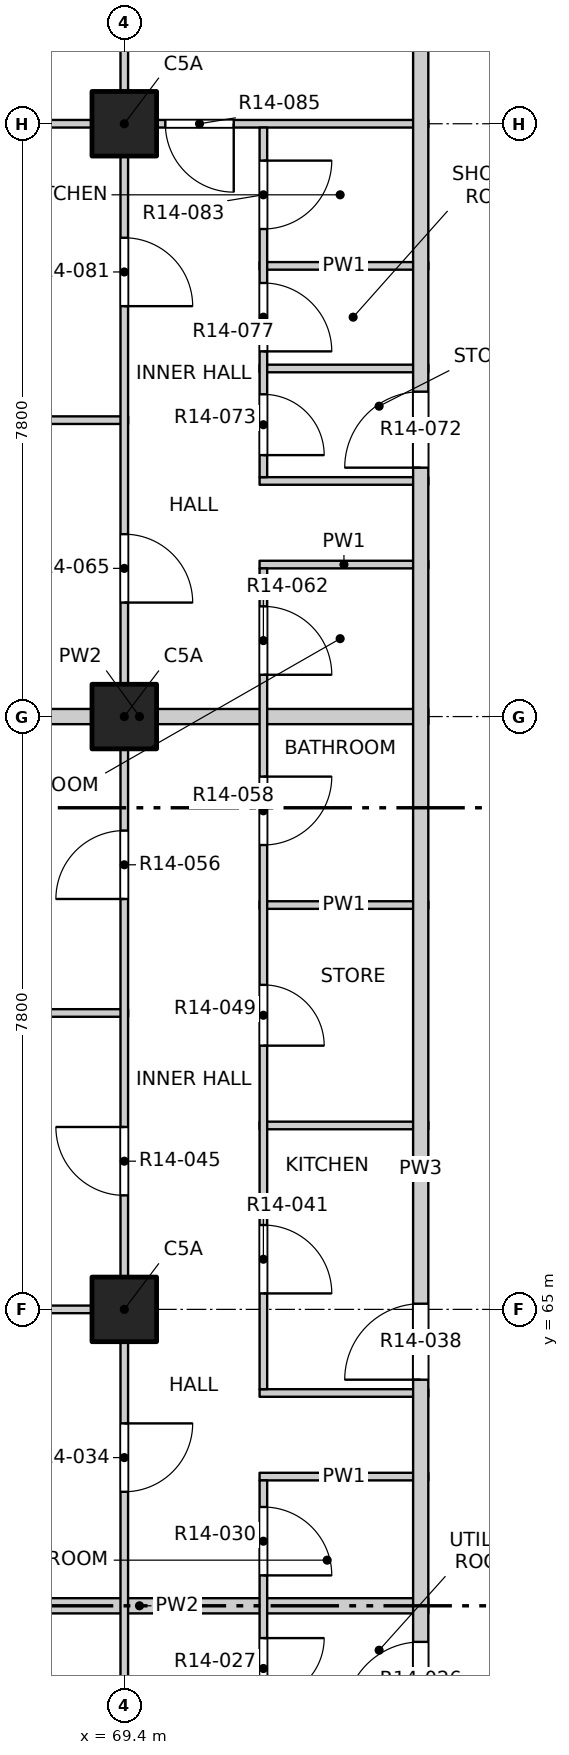
"""IFC4 building model, lengths in metres.
Left out: names, types, materials, properties, quantities, classifications, styles, units other than length and angle.
Written with IfcOpenShell. Run it as: python <this file> out.ifc"""

import sys

from ifc_helpers import new_model, si_unit, direction, frame, frame_2d, origin, origin_2d, place, context, subcontext, project, spatial, rectangle, extrude, element, fill, save


model = new_model("IFC4")
c1 = context("Model", 3, precision=1e-05, world=origin(), true_north=direction((0.0, 1.0)))
c2 = subcontext(c1, "Body", "Model", "MODEL_VIEW")
j1 = project(units=[si_unit("LENGTHUNIT", "METRE"), si_unit("PLANEANGLEUNIT", "RADIAN")], contexts=[c1])
p1 = place(None, origin())
s1 = spatial("IfcSite", under=j1, at=p1, CompositionType="ELEMENT")
p2 = place(p1, origin())
s2 = spatial("IfcBuilding", under=s1, at=p2, CompositionType="ELEMENT")
p3 = place(p2, frame((0.0, 0.0, 152.0)))
s3 = spatial("IfcBuildingStorey", under=s2, at=p3, CompositionType="ELEMENT", Elevation=152.0)
for number, where, z_axis, x_axis in (
    (1, (69.4, 65.0, -0.25), (0.0, 0.0, 1.0), (1.0, 0.0, 0.0)),
    (2, (69.4, 72.8, -0.25), (0.0, 0.0, 1.0), (1.0, 0.0, 0.0)),
    (3, (69.4, 80.6, -0.25), (0.0, 0.0, 1.0), (1.0, 0.0, 0.0)),
):
    element("IfcColumn", number, at=place(p3, frame(where, z_axis=z_axis, x_axis=x_axis)), inside=s3, PredefinedType="COLUMN", context=c2, shape_type="SweptSolid", body=[
        extrude(rectangle(XDim=0.85, YDim=0.85, at=origin_2d()), origin(), (0.0, 0.0, 1.0), 3.4),
    ])
p4 = place(p3, frame((65.8, 61.1, 0.0), z_axis=(0.0, 0.0, 1.0), x_axis=(1.0, 0.0, 0.0)))
e4 = element("IfcWall", 4, at=p4, inside=s3, PredefinedType="PARTITIONING", context=c2, shape_type="SweptSolid", body=[
    extrude(rectangle(XDim=7.6, YDim=0.2, at=frame_2d((3.8, 0.0))), origin(), (0.0, 0.0, 1.0), 2.55),
])
for number, where, z_axis, x_axis in (
    (5, (71.18, 62.8, 0.0), (0.0, 0.0, 1.0), (1.0, 0.0, 0.0)),
    (6, (71.18, 63.9, 0.0), (0.0, 0.0, 1.0), (1.0, 0.0, 0.0)),
):
    element("IfcWall", number, at=place(p3, frame(where, z_axis=z_axis, x_axis=x_axis)), inside=s3, PredefinedType="PARTITIONING", context=c2, shape_type="SweptSolid", body=[
        extrude(rectangle(XDim=2.22, YDim=0.1, at=frame_2d((1.11, 0.0))), origin(), (0.0, 0.0, 1.0), 3.15),
    ])
p5 = place(p3, frame((65.8, 65.0, 0.0), z_axis=(0.0, 0.0, 1.0), x_axis=(1.0, 0.0, 0.0)))
e7 = element("IfcWall", 7, at=p5, inside=s3, PredefinedType="PARTITIONING", context=c2, shape_type="SweptSolid", body=[
    extrude(rectangle(XDim=3.65, YDim=0.1, at=frame_2d((1.825, 0.0))), origin(), (0.0, 0.0, 1.0), 3.15),
])
p6 = place(p3, frame((71.18, 67.42, 0.0), z_axis=(0.0, 0.0, 1.0), x_axis=(1.0, 0.0, 0.0)))
e8 = element("IfcWall", 8, at=p6, inside=s3, PredefinedType="PARTITIONING", context=c2, shape_type="SweptSolid", body=[
    extrude(rectangle(XDim=2.22, YDim=0.1, at=frame_2d((1.11, 0.0))), origin(), (0.0, 0.0, 1.0), 3.15),
])
p7 = place(p3, frame((65.8, 68.9, 0.0), z_axis=(0.0, 0.0, 1.0), x_axis=(1.0, 0.0, 0.0)))
e9 = element("IfcWall", 9, at=p7, inside=s3, PredefinedType="PARTITIONING", context=c2, shape_type="SweptSolid", body=[
    extrude(rectangle(XDim=3.65, YDim=0.1, at=frame_2d((1.825, 0.0))), origin(), (0.0, 0.0, 1.0), 2.55),
])
p8 = place(p3, frame((71.18, 70.32, 0.0), z_axis=(0.0, 0.0, 1.0), x_axis=(1.0, 0.0, 0.0)))
e10 = element("IfcWall", 10, at=p8, inside=s3, PredefinedType="PARTITIONING", context=c2, shape_type="SweptSolid", body=[
    extrude(rectangle(XDim=2.22, YDim=0.1, at=frame_2d((1.11, 0.0))), origin(), (0.0, 0.0, 1.0), 3.15),
])
p9 = place(p3, frame((65.8, 72.8, 0.0), z_axis=(0.0, 0.0, 1.0), x_axis=(1.0, 0.0, 0.0)))
e11 = element("IfcWall", 11, at=p9, inside=s3, PredefinedType="PARTITIONING", context=c2, shape_type="SweptSolid", body=[
    extrude(rectangle(XDim=7.6, YDim=0.2, at=frame_2d((3.8, 0.0))), origin(), (0.0, 0.0, 1.0), 3.15),
])
for number, where, z_axis, x_axis in (
    (12, (71.18, 74.8, 0.0), (0.0, 0.0, 1.0), (1.0, 0.0, 0.0)),
    (13, (71.18, 75.9, 0.0), (0.0, 0.0, 1.0), (1.0, 0.0, 0.0)),
):
    element("IfcWall", number, at=place(p3, frame(where, z_axis=z_axis, x_axis=x_axis)), inside=s3, PredefinedType="PARTITIONING", context=c2, shape_type="SweptSolid", body=[
        extrude(rectangle(XDim=2.22, YDim=0.1, at=frame_2d((1.11, 0.0))), origin(), (0.0, 0.0, 1.0), 3.15),
    ])
p10 = place(p3, frame((65.8, 76.7, 0.0), z_axis=(0.0, 0.0, 1.0), x_axis=(1.0, 0.0, 0.0)))
e14 = element("IfcWall", 14, at=p10, inside=s3, PredefinedType="PARTITIONING", context=c2, shape_type="SweptSolid", body=[
    extrude(rectangle(XDim=3.65, YDim=0.1, at=frame_2d((1.825, 0.0))), origin(), (0.0, 0.0, 1.0), 2.55),
])
for number, where, z_axis, x_axis in (
    (15, (71.18, 77.38, 0.0), (0.0, 0.0, 1.0), (1.0, 0.0, 0.0)),
    (16, (71.18, 78.73, 0.0), (0.0, 0.0, 1.0), (1.0, 0.0, 0.0)),
):
    element("IfcWall", number, at=place(p3, frame(where, z_axis=z_axis, x_axis=x_axis)), inside=s3, PredefinedType="PARTITIONING", context=c2, shape_type="SweptSolid", body=[
        extrude(rectangle(XDim=2.22, YDim=0.1, at=frame_2d((1.11, 0.0))), origin(), (0.0, 0.0, 1.0), 3.15),
    ])
p11 = place(p3, frame((65.8, 80.6, 0.0), z_axis=(0.0, 0.0, 1.0), x_axis=(1.0, 0.0, 0.0)))
e17 = element("IfcWall", 17, at=p11, inside=s3, PredefinedType="PARTITIONING", context=c2, shape_type="SweptSolid", body=[
    extrude(rectangle(XDim=7.6, YDim=0.1, at=frame_2d((3.8, 0.0))), origin(), (0.0, 0.0, 1.0), 3.15),
])
p12 = place(p11, frame((4.14, 0.0, 0.0)))
e18 = element("IfcOpeningElement", 18, at=p12, cuts=e17, PredefinedType="OPENING", context=c2, shape_type="SweptSolid", body=[
    extrude(rectangle(XDim=0.9, YDim=2.1, at=frame_2d((0.45, 1.05))), frame((0.0, 0.06, 0.0), z_axis=(0.0, -1.0, 0.0), x_axis=(1.0, 0.0, 0.0)), (0.0, 0.0, 1.0), 0.12),
])
p13 = place(p3, frame((69.4, 45.8, 0.0), z_axis=(0.0, 0.0, 1.0), x_axis=(0.0, 1.0, 0.0)))
e19 = element("IfcWall", 19, at=p13, inside=s3, PredefinedType="PARTITIONING", context=c2, shape_type="SweptSolid", body=[
    extrude(rectangle(XDim=38.4, YDim=0.1, at=frame_2d((19.2, 0.0))), origin(), (0.0, 0.0, 1.0), 3.15),
])
p14 = place(p13, frame((1.05, 0.0, 0.0)))
e20 = element("IfcOpeningElement", 20, at=p14, cuts=e19, PredefinedType="OPENING", context=c2, shape_type="SweptSolid", body=[
    extrude(rectangle(XDim=1.2, YDim=2.1, at=frame_2d((0.6, 1.05))), frame((0.0, 0.06, 0.0), z_axis=(0.0, -1.0, 0.0), x_axis=(1.0, 0.0, 0.0)), (0.0, 0.0, 1.0), 0.12),
])
p15 = place(p13, frame((6.9, 0.0, 0.0)))
e21 = element("IfcOpeningElement", 21, at=p15, cuts=e19, PredefinedType="OPENING", context=c2, shape_type="SweptSolid", body=[
    extrude(rectangle(XDim=1.2, YDim=2.1, at=frame_2d((0.6, 1.05))), frame((0.0, 0.06, 0.0), z_axis=(0.0, -1.0, 0.0), x_axis=(1.0, 0.0, 0.0)), (0.0, 0.0, 1.0), 0.12),
])
p16 = place(p13, frame((12.9, 0.0, 0.0)))
e22 = element("IfcOpeningElement", 22, at=p16, cuts=e19, PredefinedType="OPENING", context=c2, shape_type="SweptSolid", body=[
    extrude(rectangle(XDim=0.9, YDim=2.1, at=frame_2d((0.45, 1.05))), frame((0.0, 0.06, 0.0), z_axis=(0.0, -1.0, 0.0), x_axis=(1.0, 0.0, 0.0)), (0.0, 0.0, 1.0), 0.12),
])
p17 = place(p13, frame((16.8, 0.0, 0.0)))
e23 = element("IfcOpeningElement", 23, at=p17, cuts=e19, PredefinedType="OPENING", context=c2, shape_type="SweptSolid", body=[
    extrude(rectangle(XDim=0.9, YDim=2.1, at=frame_2d((0.45, 1.05))), frame((0.0, 0.06, 0.0), z_axis=(0.0, -1.0, 0.0), x_axis=(1.0, 0.0, 0.0)), (0.0, 0.0, 1.0), 0.12),
])
p18 = place(p13, frame((20.7, 0.0, 0.0)))
e24 = element("IfcOpeningElement", 24, at=p18, cuts=e19, PredefinedType="OPENING", context=c2, shape_type="SweptSolid", body=[
    extrude(rectangle(XDim=0.9, YDim=2.1, at=frame_2d((0.45, 1.05))), frame((0.0, 0.06, 0.0), z_axis=(0.0, -1.0, 0.0), x_axis=(1.0, 0.0, 0.0)), (0.0, 0.0, 1.0), 0.12),
])
p19 = place(p13, frame((24.6, 0.0, 0.0)))
e25 = element("IfcOpeningElement", 25, at=p19, cuts=e19, PredefinedType="OPENING", context=c2, shape_type="SweptSolid", body=[
    extrude(rectangle(XDim=0.9, YDim=2.1, at=frame_2d((0.45, 1.05))), frame((0.0, 0.06, 0.0), z_axis=(0.0, -1.0, 0.0), x_axis=(1.0, 0.0, 0.0)), (0.0, 0.0, 1.0), 0.12),
])
p20 = place(p13, frame((28.5, 0.0, 0.0)))
e26 = element("IfcOpeningElement", 26, at=p20, cuts=e19, PredefinedType="OPENING", context=c2, shape_type="SweptSolid", body=[
    extrude(rectangle(XDim=0.9, YDim=2.1, at=frame_2d((0.45, 1.05))), frame((0.0, 0.06, 0.0), z_axis=(0.0, -1.0, 0.0), x_axis=(1.0, 0.0, 0.0)), (0.0, 0.0, 1.0), 0.12),
])
p21 = place(p13, frame((32.4, 0.0, 0.0)))
e27 = element("IfcOpeningElement", 27, at=p21, cuts=e19, PredefinedType="OPENING", context=c2, shape_type="SweptSolid", body=[
    extrude(rectangle(XDim=0.9, YDim=2.1, at=frame_2d((0.45, 1.05))), frame((0.0, 0.06, 0.0), z_axis=(0.0, -1.0, 0.0), x_axis=(1.0, 0.0, 0.0)), (0.0, 0.0, 1.0), 0.12),
])
p22 = place(p13, frame((36.15, 0.0, 0.0)))
e28 = element("IfcOpeningElement", 28, at=p22, cuts=e19, PredefinedType="OPENING", context=c2, shape_type="SweptSolid", body=[
    extrude(rectangle(XDim=1.2, YDim=2.1, at=frame_2d((0.6, 1.05))), frame((0.0, 0.06, 0.0), z_axis=(0.0, -1.0, 0.0), x_axis=(1.0, 0.0, 0.0)), (0.0, 0.0, 1.0), 0.12),
])
p23 = place(p3, frame((71.23, 59.5, 0.0), z_axis=(0.0, 0.0, 1.0), x_axis=(0.0, 1.0, 0.0)))
e29 = element("IfcWall", 29, at=p23, inside=s3, PredefinedType="PARTITIONING", context=c2, shape_type="SweptSolid", body=[
    extrude(rectangle(XDim=3.25, YDim=0.1, at=frame_2d((1.625, 0.0))), origin(), (0.0, 0.0, 1.0), 3.15),
])
p24 = place(p23, frame((0.375, 0.0, 0.0)))
e30 = element("IfcOpeningElement", 30, at=p24, cuts=e29, PredefinedType="OPENING", context=c2, shape_type="SweptSolid", body=[
    extrude(rectangle(XDim=0.8, YDim=2.1, at=frame_2d((0.4, 1.05))), frame((0.0, 0.06, 0.0), z_axis=(0.0, -1.0, 0.0), x_axis=(1.0, 0.0, 0.0)), (0.0, 0.0, 1.0), 0.12),
])
p25 = place(p23, frame((2.0, 0.0, 0.0)))
e31 = element("IfcOpeningElement", 31, at=p25, cuts=e29, PredefinedType="OPENING", context=c2, shape_type="SweptSolid", body=[
    extrude(rectangle(XDim=0.9, YDim=2.1, at=frame_2d((0.45, 1.05))), frame((0.0, 0.06, 0.0), z_axis=(0.0, -1.0, 0.0), x_axis=(1.0, 0.0, 0.0)), (0.0, 0.0, 1.0), 0.12),
])
p26 = place(p3, frame((71.23, 63.95, 0.0), z_axis=(0.0, 0.0, 1.0), x_axis=(0.0, 1.0, 0.0)))
e32 = element("IfcWall", 32, at=p26, inside=s3, PredefinedType="PARTITIONING", context=c2, shape_type="SweptSolid", body=[
    extrude(rectangle(XDim=10.8, YDim=0.1, at=frame_2d((5.4, 0.0))), origin(), (0.0, 0.0, 1.0), 3.15),
])
p27 = place(p26, frame((1.26, 0.0, 0.0)))
e33 = element("IfcOpeningElement", 33, at=p27, cuts=e32, PredefinedType="OPENING", context=c2, shape_type="SweptSolid", body=[
    extrude(rectangle(XDim=0.9, YDim=2.1, at=frame_2d((0.45, 1.05))), frame((0.0, 0.06, 0.0), z_axis=(0.0, -1.0, 0.0), x_axis=(1.0, 0.0, 0.0)), (0.0, 0.0, 1.0), 0.12),
])
p28 = place(p26, frame((4.52, 0.0, 0.0)))
e34 = element("IfcOpeningElement", 34, at=p28, cuts=e32, PredefinedType="OPENING", context=c2, shape_type="SweptSolid", body=[
    extrude(rectangle(XDim=0.8, YDim=2.1, at=frame_2d((0.4, 1.05))), frame((0.0, 0.06, 0.0), z_axis=(0.0, -1.0, 0.0), x_axis=(1.0, 0.0, 0.0)), (0.0, 0.0, 1.0), 0.12),
])
p29 = place(p26, frame((7.16, 0.0, 0.0)))
e35 = element("IfcOpeningElement", 35, at=p29, cuts=e32, PredefinedType="OPENING", context=c2, shape_type="SweptSolid", body=[
    extrude(rectangle(XDim=0.9, YDim=2.1, at=frame_2d((0.45, 1.05))), frame((0.0, 0.06, 0.0), z_axis=(0.0, -1.0, 0.0), x_axis=(1.0, 0.0, 0.0)), (0.0, 0.0, 1.0), 0.12),
])
p30 = place(p26, frame((9.4, 0.0, 0.0)))
e36 = element("IfcOpeningElement", 36, at=p30, cuts=e32, PredefinedType="OPENING", context=c2, shape_type="SweptSolid", body=[
    extrude(rectangle(XDim=0.9, YDim=2.1, at=frame_2d((0.45, 1.05))), frame((0.0, 0.06, 0.0), z_axis=(0.0, -1.0, 0.0), x_axis=(1.0, 0.0, 0.0)), (0.0, 0.0, 1.0), 0.12),
])
p31 = place(p3, frame((71.23, 75.95, 0.0), z_axis=(0.0, 0.0, 1.0), x_axis=(0.0, 1.0, 0.0)))
e37 = element("IfcWall", 37, at=p31, inside=s3, PredefinedType="PARTITIONING", context=c2, shape_type="SweptSolid", body=[
    extrude(rectangle(XDim=4.6, YDim=0.1, at=frame_2d((2.3, 0.0))), origin(), (0.0, 0.0, 1.0), 3.15),
])
p32 = place(p31, frame((0.29, 0.0, 0.0)))
e38 = element("IfcOpeningElement", 38, at=p32, cuts=e37, PredefinedType="OPENING", context=c2, shape_type="SweptSolid", body=[
    extrude(rectangle(XDim=0.8, YDim=2.1, at=frame_2d((0.4, 1.05))), frame((0.0, 0.06, 0.0), z_axis=(0.0, -1.0, 0.0), x_axis=(1.0, 0.0, 0.0)), (0.0, 0.0, 1.0), 0.12),
])
p33 = place(p31, frame((1.655, 0.0, 0.0)))
e39 = element("IfcOpeningElement", 39, at=p33, cuts=e37, PredefinedType="OPENING", context=c2, shape_type="SweptSolid", body=[
    extrude(rectangle(XDim=0.9, YDim=2.1, at=frame_2d((0.45, 1.05))), frame((0.0, 0.06, 0.0), z_axis=(0.0, -1.0, 0.0), x_axis=(1.0, 0.0, 0.0)), (0.0, 0.0, 1.0), 0.12),
])
p34 = place(p31, frame((3.265, 0.0, 0.0)))
e40 = element("IfcOpeningElement", 40, at=p34, cuts=e37, PredefinedType="OPENING", context=c2, shape_type="SweptSolid", body=[
    extrude(rectangle(XDim=0.9, YDim=2.1, at=frame_2d((0.45, 1.05))), frame((0.0, 0.06, 0.0), z_axis=(0.0, -1.0, 0.0), x_axis=(1.0, 0.0, 0.0)), (0.0, 0.0, 1.0), 0.12),
])
p35 = place(p3, frame((73.3, 49.5, 0.0), z_axis=(0.0, 0.0, 1.0), x_axis=(0.0, 1.0, 0.0)))
e41 = element("IfcWall", 41, at=p35, inside=s3, PredefinedType="PARTITIONING", context=c2, shape_type="SweptSolid", body=[
    extrude(rectangle(XDim=34.7, YDim=0.2, at=frame_2d((17.35, 0.0))), origin(), (0.0, 0.0, 1.0), 3.15),
])
p36 = place(p35, frame((10.125, 0.0, 0.0)))
e42 = element("IfcOpeningElement", 42, at=p36, cuts=e41, PredefinedType="OPENING", context=c2, shape_type="SweptSolid", body=[
    extrude(rectangle(XDim=1.0, YDim=2.1, at=frame_2d((0.5, 1.05))), frame((0.0, 0.11, 0.0), z_axis=(0.0, -1.0, 0.0), x_axis=(1.0, 0.0, 0.0)), (0.0, 0.0, 1.0), 0.22),
])
p37 = place(p35, frame((14.575, 0.0, 0.0)))
e43 = element("IfcOpeningElement", 43, at=p37, cuts=e41, PredefinedType="OPENING", context=c2, shape_type="SweptSolid", body=[
    extrude(rectangle(XDim=1.0, YDim=2.1, at=frame_2d((0.5, 1.05))), frame((0.0, 0.11, 0.0), z_axis=(0.0, -1.0, 0.0), x_axis=(1.0, 0.0, 0.0)), (0.0, 0.0, 1.0), 0.22),
])
p38 = place(p35, frame((26.575, 0.0, 0.0)))
e44 = element("IfcOpeningElement", 44, at=p38, cuts=e41, PredefinedType="OPENING", context=c2, shape_type="SweptSolid", body=[
    extrude(rectangle(XDim=1.0, YDim=2.1, at=frame_2d((0.5, 1.05))), frame((0.0, 0.11, 0.0), z_axis=(0.0, -1.0, 0.0), x_axis=(1.0, 0.0, 0.0)), (0.0, 0.0, 1.0), 0.22),
])
p39 = place(p36, origin())
e45 = element("IfcDoor", 45, at=p39, inside=s3, OperationType="SINGLE_SWING_RIGHT", PredefinedType="DOOR", context=c2, shape_type="SweptSolid", body=[
    extrude(rectangle(XDim=1.0, YDim=2.1, at=frame_2d((0.5, 1.05))), frame((0.0, 0.025, 0.0), z_axis=(0.0, -1.0, 0.0), x_axis=(1.0, 0.0, 0.0)), (0.0, 0.0, 1.0), 0.05),
])
fill(e42, e45)
p40 = place(p24, origin())
e46 = element("IfcDoor", 46, at=p40, inside=s3, OperationType="SINGLE_SWING_LEFT", PredefinedType="DOOR", context=c2, shape_type="SweptSolid", body=[
    extrude(rectangle(XDim=0.8, YDim=2.1, at=frame_2d((0.4, 1.05))), frame((0.0, 0.025, 0.0), z_axis=(0.0, -1.0, 0.0), x_axis=(1.0, 0.0, 0.0)), (0.0, 0.0, 1.0), 0.05),
])
fill(e30, e46)
p41 = place(p25, origin())
e47 = element("IfcDoor", 47, at=p41, inside=s3, OperationType="SINGLE_SWING_RIGHT", PredefinedType="DOOR", context=c2, shape_type="SweptSolid", body=[
    extrude(rectangle(XDim=0.9, YDim=2.1, at=frame_2d((0.45, 1.05))), frame((0.0, 0.025, 0.0), z_axis=(0.0, -1.0, 0.0), x_axis=(1.0, 0.0, 0.0)), (0.0, 0.0, 1.0), 0.05),
])
fill(e31, e47)
p42 = place(p17, origin())
e48 = element("IfcDoor", 48, at=p42, inside=s3, OperationType="SINGLE_SWING_LEFT", PredefinedType="DOOR", context=c2, shape_type="SweptSolid", body=[
    extrude(rectangle(XDim=0.9, YDim=2.1, at=frame_2d((0.45, 1.05))), frame((0.0, 0.025, 0.0), z_axis=(0.0, -1.0, 0.0), x_axis=(1.0, 0.0, 0.0)), (0.0, 0.0, 1.0), 0.05),
])
fill(e23, e48)
p43 = place(p37, origin())
e49 = element("IfcDoor", 49, at=p43, inside=s3, OperationType="SINGLE_SWING_RIGHT", PredefinedType="DOOR", context=c2, shape_type="SweptSolid", body=[
    extrude(rectangle(XDim=1.0, YDim=2.1, at=frame_2d((0.5, 1.05))), frame((0.0, 0.025, 0.0), z_axis=(0.0, -1.0, 0.0), x_axis=(1.0, 0.0, 0.0)), (0.0, 0.0, 1.0), 0.05),
])
fill(e43, e49)
p44 = place(p27, origin())
e50 = element("IfcDoor", 50, at=p44, inside=s3, OperationType="SINGLE_SWING_RIGHT", PredefinedType="DOOR", context=c2, shape_type="SweptSolid", body=[
    extrude(rectangle(XDim=0.9, YDim=2.1, at=frame_2d((0.45, 1.05))), frame((0.0, 0.025, 0.0), z_axis=(0.0, -1.0, 0.0), x_axis=(1.0, 0.0, 0.0)), (0.0, 0.0, 1.0), 0.05),
])
fill(e33, e50)
p45 = place(p18, origin())
e51 = element("IfcDoor", 51, at=p45, inside=s3, OperationType="SINGLE_SWING_RIGHT", PredefinedType="DOOR", context=c2, shape_type="SweptSolid", body=[
    extrude(rectangle(XDim=0.9, YDim=2.1, at=frame_2d((0.45, 1.05))), frame((0.0, 0.025, 0.0), z_axis=(0.0, -1.0, 0.0), x_axis=(1.0, 0.0, 0.0)), (0.0, 0.0, 1.0), 0.05),
])
fill(e24, e51)
p46 = place(p28, origin())
e52 = element("IfcDoor", 52, at=p46, inside=s3, OperationType="SINGLE_SWING_RIGHT", PredefinedType="DOOR", context=c2, shape_type="SweptSolid", body=[
    extrude(rectangle(XDim=0.8, YDim=2.1, at=frame_2d((0.4, 1.05))), frame((0.0, 0.025, 0.0), z_axis=(0.0, -1.0, 0.0), x_axis=(1.0, 0.0, 0.0)), (0.0, 0.0, 1.0), 0.05),
])
fill(e34, e52)
p47 = place(p19, origin())
e53 = element("IfcDoor", 53, at=p47, inside=s3, OperationType="SINGLE_SWING_LEFT", PredefinedType="DOOR", context=c2, shape_type="SweptSolid", body=[
    extrude(rectangle(XDim=0.9, YDim=2.1, at=frame_2d((0.45, 1.05))), frame((0.0, 0.025, 0.0), z_axis=(0.0, -1.0, 0.0), x_axis=(1.0, 0.0, 0.0)), (0.0, 0.0, 1.0), 0.05),
])
fill(e25, e53)
p48 = place(p29, origin())
e54 = element("IfcDoor", 54, at=p48, inside=s3, OperationType="SINGLE_SWING_LEFT", PredefinedType="DOOR", context=c2, shape_type="SweptSolid", body=[
    extrude(rectangle(XDim=0.9, YDim=2.1, at=frame_2d((0.45, 1.05))), frame((0.0, 0.025, 0.0), z_axis=(0.0, -1.0, 0.0), x_axis=(1.0, 0.0, 0.0)), (0.0, 0.0, 1.0), 0.05),
])
fill(e35, e54)
p49 = place(p30, origin())
e55 = element("IfcDoor", 55, at=p49, inside=s3, OperationType="SINGLE_SWING_RIGHT", PredefinedType="DOOR", context=c2, shape_type="SweptSolid", body=[
    extrude(rectangle(XDim=0.9, YDim=2.1, at=frame_2d((0.45, 1.05))), frame((0.0, 0.025, 0.0), z_axis=(0.0, -1.0, 0.0), x_axis=(1.0, 0.0, 0.0)), (0.0, 0.0, 1.0), 0.05),
])
fill(e36, e55)
p50 = place(p20, origin())
e56 = element("IfcDoor", 56, at=p50, inside=s3, OperationType="SINGLE_SWING_RIGHT", PredefinedType="DOOR", context=c2, shape_type="SweptSolid", body=[
    extrude(rectangle(XDim=0.9, YDim=2.1, at=frame_2d((0.45, 1.05))), frame((0.0, 0.025, 0.0), z_axis=(0.0, -1.0, 0.0), x_axis=(1.0, 0.0, 0.0)), (0.0, 0.0, 1.0), 0.05),
])
fill(e26, e56)
p51 = place(p38, origin())
e57 = element("IfcDoor", 57, at=p51, inside=s3, OperationType="SINGLE_SWING_RIGHT", PredefinedType="DOOR", context=c2, shape_type="SweptSolid", body=[
    extrude(rectangle(XDim=1.0, YDim=2.1, at=frame_2d((0.5, 1.05))), frame((0.0, 0.025, 0.0), z_axis=(0.0, -1.0, 0.0), x_axis=(1.0, 0.0, 0.0)), (0.0, 0.0, 1.0), 0.05),
])
fill(e44, e57)
p52 = place(p32, origin())
e58 = element("IfcDoor", 58, at=p52, inside=s3, OperationType="SINGLE_SWING_RIGHT", PredefinedType="DOOR", context=c2, shape_type="SweptSolid", body=[
    extrude(rectangle(XDim=0.8, YDim=2.1, at=frame_2d((0.4, 1.05))), frame((0.0, 0.025, 0.0), z_axis=(0.0, -1.0, 0.0), x_axis=(1.0, 0.0, 0.0)), (0.0, 0.0, 1.0), 0.05),
])
fill(e38, e58)
p53 = place(p33, origin())
e59 = element("IfcDoor", 59, at=p53, inside=s3, OperationType="SINGLE_SWING_RIGHT", PredefinedType="DOOR", context=c2, shape_type="SweptSolid", body=[
    extrude(rectangle(XDim=0.9, YDim=2.1, at=frame_2d((0.45, 1.05))), frame((0.0, 0.025, 0.0), z_axis=(0.0, -1.0, 0.0), x_axis=(1.0, 0.0, 0.0)), (0.0, 0.0, 1.0), 0.05),
])
fill(e39, e59)
p54 = place(p21, origin())
e60 = element("IfcDoor", 60, at=p54, inside=s3, OperationType="SINGLE_SWING_RIGHT", PredefinedType="DOOR", context=c2, shape_type="SweptSolid", body=[
    extrude(rectangle(XDim=0.9, YDim=2.1, at=frame_2d((0.45, 1.05))), frame((0.0, 0.025, 0.0), z_axis=(0.0, -1.0, 0.0), x_axis=(1.0, 0.0, 0.0)), (0.0, 0.0, 1.0), 0.05),
])
fill(e27, e60)
p55 = place(p34, origin())
e61 = element("IfcDoor", 61, at=p55, inside=s3, OperationType="SINGLE_SWING_LEFT", PredefinedType="DOOR", context=c2, shape_type="SweptSolid", body=[
    extrude(rectangle(XDim=0.9, YDim=2.1, at=frame_2d((0.45, 1.05))), frame((0.0, 0.025, 0.0), z_axis=(0.0, -1.0, 0.0), x_axis=(1.0, 0.0, 0.0)), (0.0, 0.0, 1.0), 0.05),
])
fill(e40, e61)
p56 = place(p12, origin())
e62 = element("IfcDoor", 62, at=p56, inside=s3, OperationType="SINGLE_SWING_LEFT", PredefinedType="DOOR", context=c2, shape_type="SweptSolid", body=[
    extrude(rectangle(XDim=0.9, YDim=2.1, at=frame_2d((0.45, 1.05))), frame((0.0, 0.025, 0.0), z_axis=(0.0, -1.0, 0.0), x_axis=(1.0, 0.0, 0.0)), (0.0, 0.0, 1.0), 0.05),
])
fill(e18, e62)
save(model, sys.argv[1])
